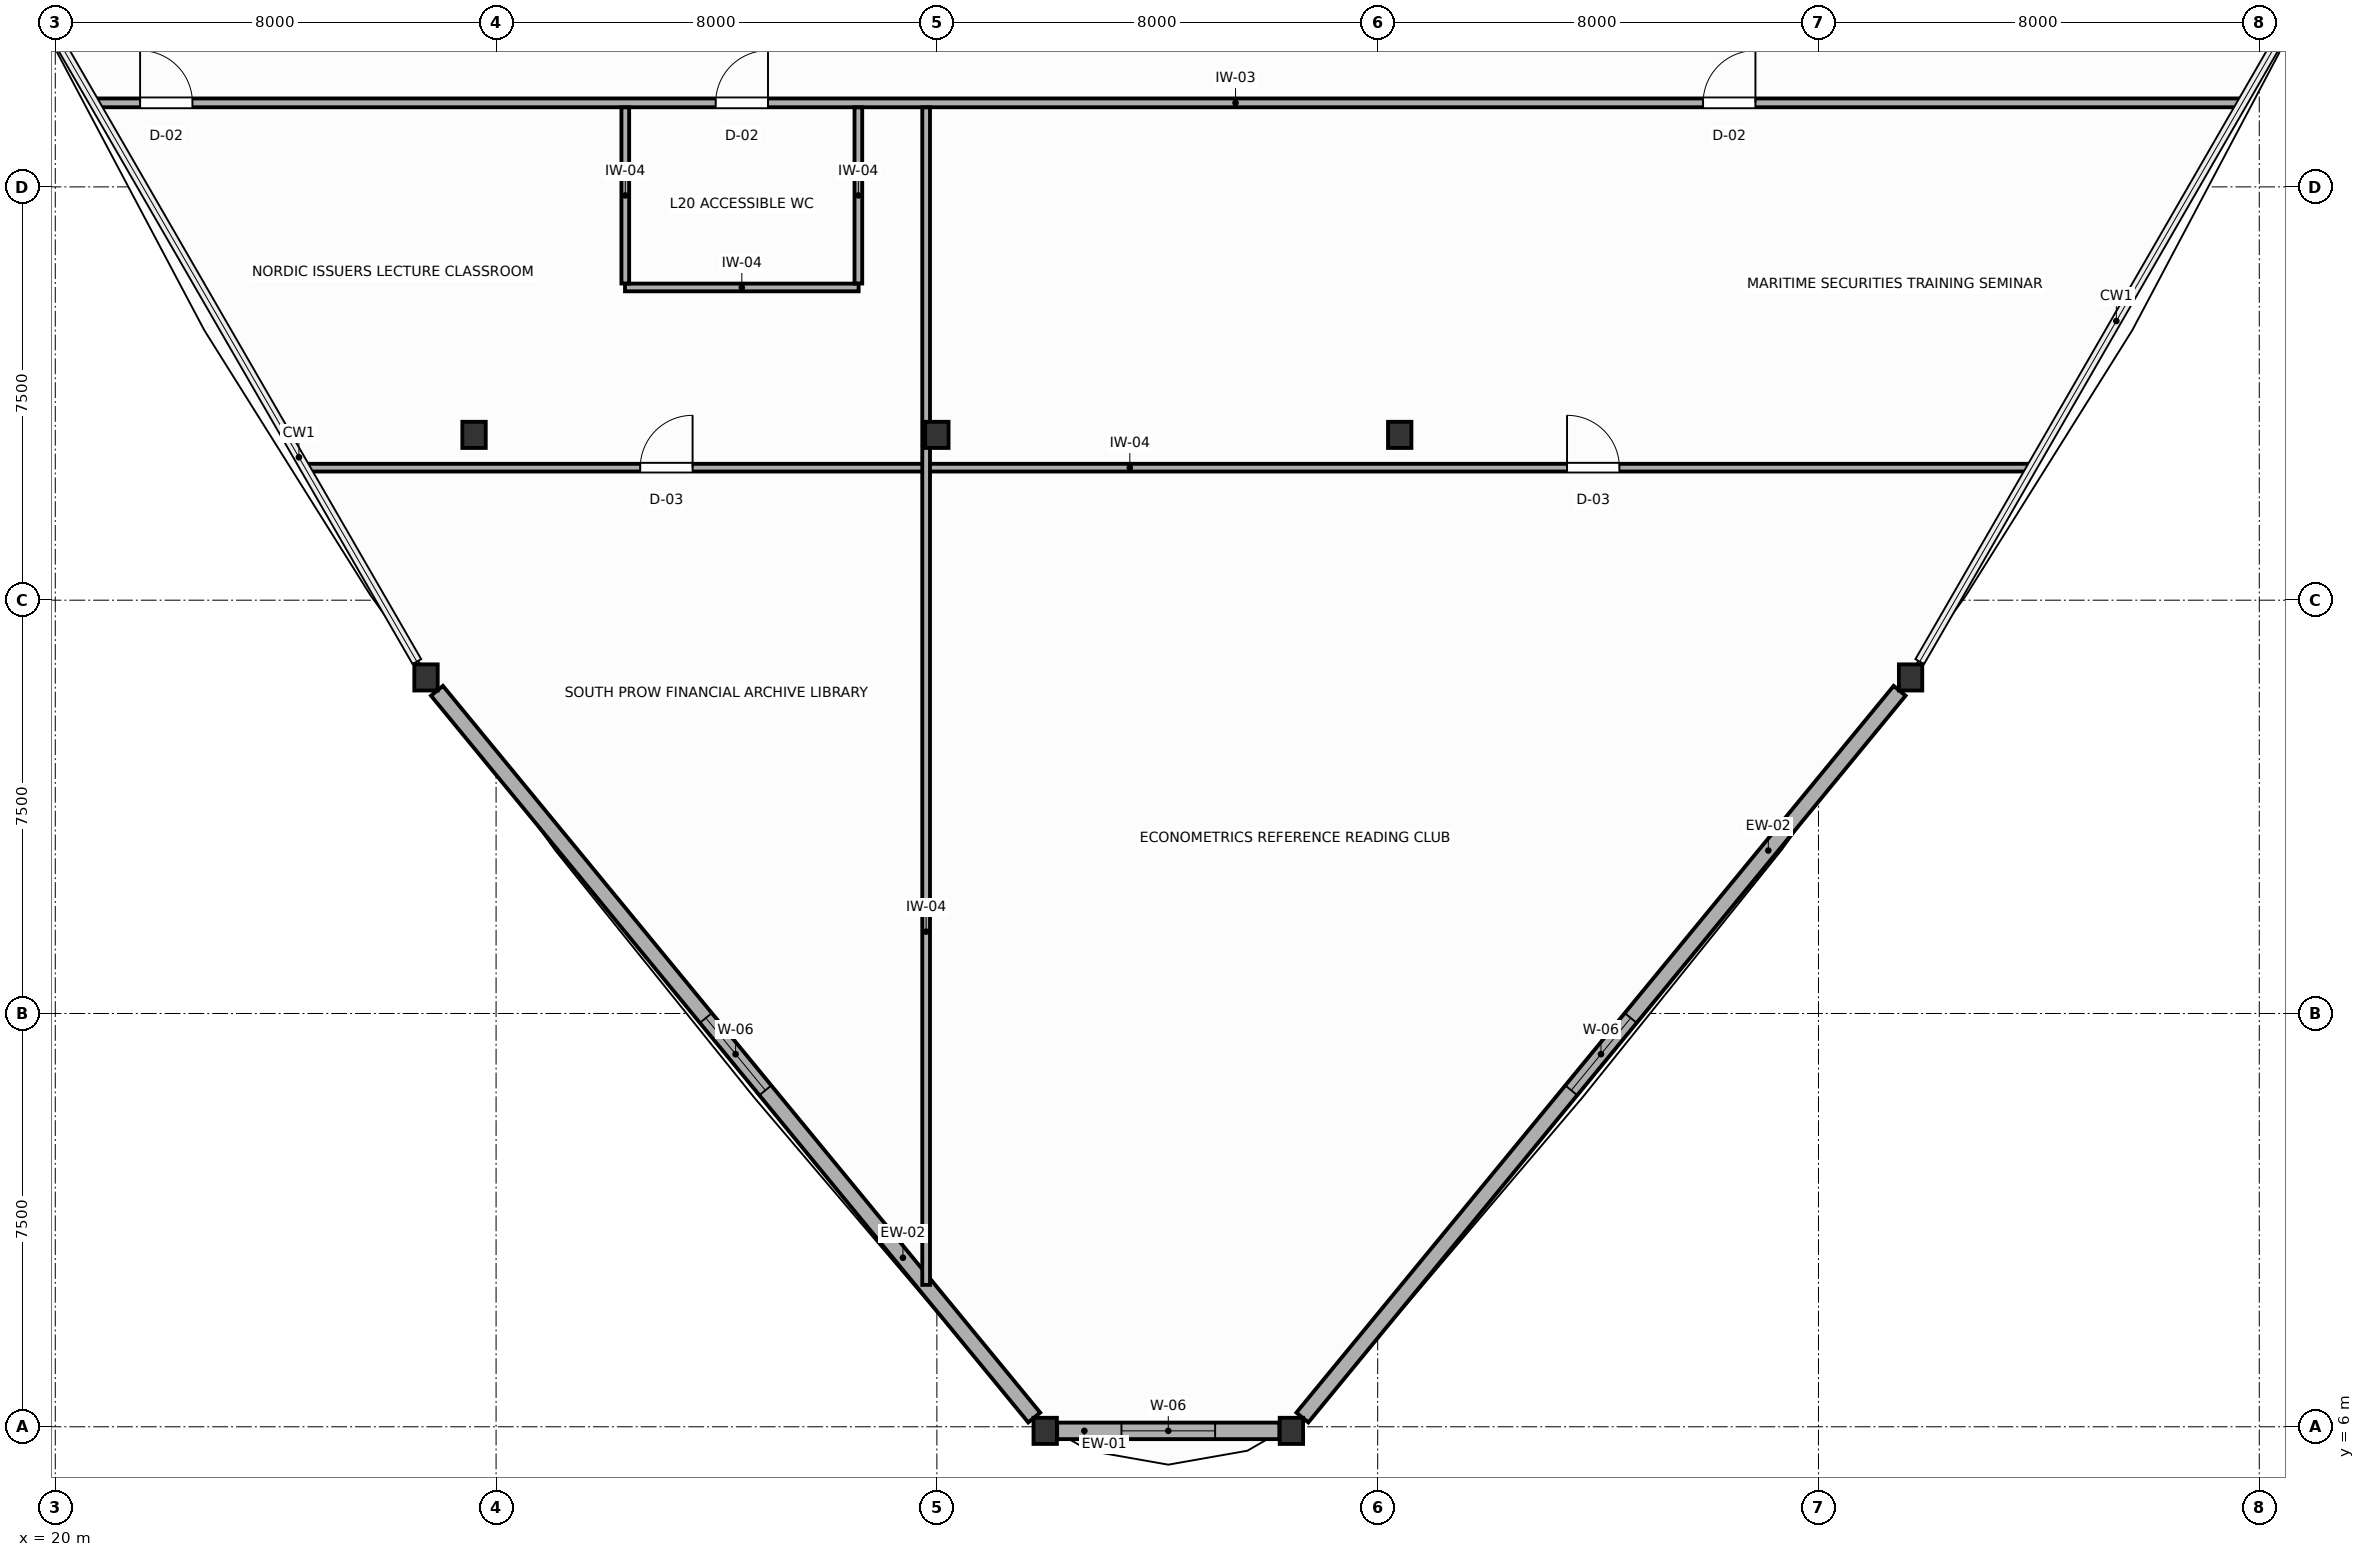
"""IFC4 building model, lengths in metres.
Left out: names, types, materials, properties, quantities, classifications, styles, units other than length and angle.
Written with IfcOpenShell. Run it as: python <this file> out.ifc"""

import sys

from ifc_helpers import new_model, si_unit, direction, frame, frame_2d, origin, origin_2d, place, context, subcontext, project, spatial, rectangle, i_section, extrude, source, transform, mapped, element, fill, save


model = new_model("IFC4")
c1 = context("Model", 3, precision=1e-05, world=origin(), true_north=direction((0.0, 1.0)))
c2 = subcontext(c1, "Body", "Model", "MODEL_VIEW")
j1 = project(units=[si_unit("LENGTHUNIT", "METRE"), si_unit("PLANEANGLEUNIT", "RADIAN")], contexts=[c1])
p1 = place(None, origin())
s1 = spatial("IfcSite", under=j1, at=p1, CompositionType="ELEMENT")
p2 = place(p1, origin())
s2 = spatial("IfcBuilding", under=s1, at=p2, CompositionType="ELEMENT")
p3 = place(p2, frame((0.0, 0.0, 83.4)))
s3 = spatial("IfcBuildingStorey", under=s2, at=p3, CompositionType="ELEMENT", Elevation=83.4)
m1 = source(origin(), c2, "Body", "SweptSolid", [
    extrude(i_section(OverallWidth=0.424, OverallDepth=0.474, WebThickness=0.045, FlangeThickness=0.072, FilletRadius=0.015, at=origin_2d()), origin(), (0.0, 0.0, 1.0), 3.9),
])
for number, where, z_axis, x_axis in (
    (1, (27.6, 24.0, 0.0), (0.0, 0.0, 1.0), (1.0, 0.0, 0.0)),
    (2, (44.4, 24.0, 0.0), (0.0, 0.0, 1.0), (1.0, 0.0, 0.0)),
    (3, (36.0, 24.0, 0.0), (0.0, 0.0, 1.0), (1.0, 0.0, 0.0)),
    (4, (26.729, 19.598, 0.0), (0.0, 0.0, 1.0), (1.0, 0.0, 0.0)),
    (5, (37.966, 5.926, 0.0), (0.0, 0.0, 1.0), (1.0, 0.0, 0.0)),
    (6, (42.434, 5.926, 0.0), (0.0, 0.0, 1.0), (1.0, 0.0, 0.0)),
    (7, (53.672, 19.598, 0.0), (0.0, 0.0, 1.0), (1.0, 0.0, 0.0)),
):
    element("IfcColumn", number, at=place(p3, frame(where, z_axis=z_axis, x_axis=x_axis)), inside=s3, PredefinedType="COLUMN", context=c2, shape_type="MappedRepresentation", body=[
        mapped(m1, transform((0.0, 0.0, 0.0), scale=1.0)),
    ])
p4 = place(p3, frame((26.927, 19.356, 0.0), z_axis=(0.0, 0.0, 1.0), x_axis=(0.634956540438, -0.772547857259, 0.0)))
e8 = element("IfcWall", 8, at=p4, inside=s3, PredefinedType="SOLIDWALL", context=c2, shape_type="SweptSolid", body=[
    extrude(rectangle(XDim=17.071, YDim=0.28, at=frame_2d((8.536, 0.0))), origin(), (0.0, 0.0, 1.0), 2.08),
])
p5 = place(p4, frame((7.686, 0.0, 0.75)))
e9 = element("IfcOpeningElement", 9, at=p5, cuts=e8, PredefinedType="OPENING", context=c2, shape_type="SweptSolid", body=[
    extrude(rectangle(XDim=1.7, YDim=1.15, at=frame_2d((0.85, 0.575))), frame((0.0, 0.15, 0.0), z_axis=(0.0, -1.0, 0.0), x_axis=(1.0, 0.0, 0.0)), (0.0, 0.0, 1.0), 0.3),
])
p6 = place(p3, frame((38.183, 5.926, 0.0), z_axis=(0.0, 0.0, 1.0), x_axis=(1.0, 0.0, 0.0)))
e10 = element("IfcWall", 10, at=p6, inside=s3, PredefinedType="SOLIDWALL", context=c2, shape_type="SweptSolid", body=[
    extrude(rectangle(XDim=4.034, YDim=0.3, at=frame_2d((2.017, 0.0))), origin(), (0.0, 0.0, 1.0), 2.08),
])
p7 = place(p6, frame((1.167, 0.0, 0.75)))
e11 = element("IfcOpeningElement", 11, at=p7, cuts=e10, PredefinedType="OPENING", context=c2, shape_type="SweptSolid", body=[
    extrude(rectangle(XDim=1.7, YDim=1.15, at=frame_2d((0.85, 0.575))), frame((0.0, 0.16, 0.0), z_axis=(0.0, -1.0, 0.0), x_axis=(1.0, 0.0, 0.0)), (0.0, 0.0, 1.0), 0.32),
])
p8 = place(p3, frame((42.633, 6.168, 0.0), z_axis=(0.0, 0.0, 1.0), x_axis=(0.634956540438, 0.772547857259, 0.0)))
e12 = element("IfcWall", 12, at=p8, inside=s3, PredefinedType="SOLIDWALL", context=c2, shape_type="SweptSolid", body=[
    extrude(rectangle(XDim=17.071, YDim=0.28, at=frame_2d((8.536, 0.0))), origin(), (0.0, 0.0, 1.0), 2.08),
])
p9 = place(p8, frame((7.686, 0.0, 0.75)))
e13 = element("IfcOpeningElement", 13, at=p9, cuts=e12, PredefinedType="OPENING", context=c2, shape_type="SweptSolid", body=[
    extrude(rectangle(XDim=1.7, YDim=1.15, at=frame_2d((0.85, 0.575))), frame((0.0, 0.15, 0.0), z_axis=(0.0, -1.0, 0.0), x_axis=(1.0, 0.0, 0.0)), (0.0, 0.0, 1.0), 0.3),
])
p10 = place(p3, frame((20.729, 30.025, 0.0), z_axis=(0.0, 0.0, 1.0), x_axis=(1.0, 0.0, 0.0)))
e14 = element("IfcWall", 14, at=p10, inside=s3, PredefinedType="PARTITIONING", context=c2, shape_type="SweptSolid", body=[
    extrude(rectangle(XDim=38.943, YDim=0.16, at=frame_2d((19.472, 0.0))), origin(), (0.0, 0.0, 1.0), 3.68),
])
p11 = place(p10, frame((11.257, 0.0, 0.0)))
e15 = element("IfcOpeningElement", 15, at=p11, cuts=e14, PredefinedType="OPENING", context=c2, shape_type="SweptSolid", body=[
    extrude(rectangle(XDim=0.95, YDim=2.05, at=frame_2d((0.475, 1.025))), frame((0.0, 0.09, 0.0), z_axis=(0.0, -1.0, 0.0), x_axis=(1.0, 0.0, 0.0)), (0.0, 0.0, 1.0), 0.18),
])
p12 = place(p10, frame((0.811, 0.0, 0.0)))
e16 = element("IfcOpeningElement", 16, at=p12, cuts=e14, PredefinedType="OPENING", context=c2, shape_type="SweptSolid", body=[
    extrude(rectangle(XDim=0.95, YDim=2.05, at=frame_2d((0.475, 1.025))), frame((0.0, 0.09, 0.0), z_axis=(0.0, -1.0, 0.0), x_axis=(1.0, 0.0, 0.0)), (0.0, 0.0, 1.0), 0.18),
])
p13 = place(p10, frame((29.177, 0.0, 0.0)))
e17 = element("IfcOpeningElement", 17, at=p13, cuts=e14, PredefinedType="OPENING", context=c2, shape_type="SweptSolid", body=[
    extrude(rectangle(XDim=0.95, YDim=2.05, at=frame_2d((0.475, 1.025))), frame((0.0, 0.09, 0.0), z_axis=(0.0, -1.0, 0.0), x_axis=(1.0, 0.0, 0.0)), (0.0, 0.0, 1.0), 0.18),
])
p14 = place(p3, frame((24.551, 23.405, 0.0), z_axis=(0.0, 0.0, 1.0), x_axis=(1.0, 0.0, 0.0)))
e18 = element("IfcWall", 18, at=p14, inside=s3, PredefinedType="PARTITIONING", context=c2, shape_type="SweptSolid", body=[
    extrude(rectangle(XDim=31.299, YDim=0.14, at=frame_2d((15.649, 0.0))), origin(), (0.0, 0.0, 1.0), 3.68),
])
p15 = place(p14, frame((6.066, 0.0, 0.0)))
e19 = element("IfcOpeningElement", 19, at=p15, cuts=e18, PredefinedType="OPENING", context=c2, shape_type="SweptSolid", body=[
    extrude(rectangle(XDim=0.95, YDim=2.05, at=frame_2d((0.475, 1.025))), frame((0.0, 0.08, 0.0), z_axis=(0.0, -1.0, 0.0), x_axis=(1.0, 0.0, 0.0)), (0.0, 0.0, 1.0), 0.16),
])
p16 = place(p14, frame((22.886, 0.0, 0.0)))
e20 = element("IfcOpeningElement", 20, at=p16, cuts=e18, PredefinedType="OPENING", context=c2, shape_type="SweptSolid", body=[
    extrude(rectangle(XDim=0.95, YDim=2.05, at=frame_2d((0.475, 1.025))), frame((0.0, 0.08, 0.0), z_axis=(0.0, -1.0, 0.0), x_axis=(1.0, 0.0, 0.0)), (0.0, 0.0, 1.0), 0.16),
])
p17 = place(p3, frame((35.805, 8.575, 0.0), z_axis=(0.0, 0.0, 1.0), x_axis=(0.0, 1.0, 0.0)))
e21 = element("IfcWall", 21, at=p17, inside=s3, PredefinedType="PARTITIONING", context=c2, shape_type="SweptSolid", body=[
    extrude(rectangle(XDim=21.368, YDim=0.14, at=frame_2d((10.684, 0.0))), origin(), (0.0, 0.0, 1.0), 2.24),
])
p18 = place(p3, frame((30.34, 26.675, 0.0), z_axis=(0.0, 0.0, 1.0), x_axis=(1.0, 0.0, 0.0)))
e22 = element("IfcWall", 22, at=p18, inside=s3, PredefinedType="PARTITIONING", context=c2, shape_type="SweptSolid", body=[
    extrude(rectangle(XDim=4.24, YDim=0.14, at=frame_2d((2.12, 0.0))), origin(), (0.0, 0.0, 1.0), 3.68),
])
for number, where, z_axis, x_axis in (
    (23, (34.575, 26.747, 0.0), (0.0, 0.0, 1.0), (0.0, 1.0, 0.0)),
    (24, (30.345, 26.747, 0.0), (0.0, 0.0, 1.0), (0.0, 1.0, 0.0)),
):
    element("IfcWall", number, at=place(p3, frame(where, z_axis=z_axis, x_axis=x_axis)), inside=s3, PredefinedType="PARTITIONING", context=c2, shape_type="SweptSolid", body=[
        extrude(rectangle(XDim=3.196, YDim=0.14, at=frame_2d((1.598, 0.0))), origin(), (0.0, 0.0, 1.0), 3.68),
    ])
p19 = place(p5, origin())
e25 = element("IfcWindow", 25, at=p19, inside=s3, PartitioningType="SINGLE_PANEL", PredefinedType="WINDOW", context=c2, shape_type="SweptSolid", body=[
    extrude(rectangle(XDim=1.7, YDim=1.15, at=frame_2d((0.85, 0.575))), frame((0.0, 0.03, 0.0), z_axis=(0.0, -1.0, 0.0), x_axis=(1.0, 0.0, 0.0)), (0.0, 0.0, 1.0), 0.06),
])
fill(e9, e25)
p20 = place(p7, origin())
e26 = element("IfcWindow", 26, at=p20, inside=s3, PartitioningType="SINGLE_PANEL", PredefinedType="WINDOW", context=c2, shape_type="SweptSolid", body=[
    extrude(rectangle(XDim=1.7, YDim=1.15, at=frame_2d((0.85, 0.575))), frame((0.0, 0.03, 0.0), z_axis=(0.0, -1.0, 0.0), x_axis=(1.0, 0.0, 0.0)), (0.0, 0.0, 1.0), 0.06),
])
fill(e11, e26)
p21 = place(p9, origin())
e27 = element("IfcWindow", 27, at=p21, inside=s3, PartitioningType="SINGLE_PANEL", PredefinedType="WINDOW", context=c2, shape_type="SweptSolid", body=[
    extrude(rectangle(XDim=1.7, YDim=1.15, at=frame_2d((0.85, 0.575))), frame((0.0, 0.03, 0.0), z_axis=(0.0, -1.0, 0.0), x_axis=(1.0, 0.0, 0.0)), (0.0, 0.0, 1.0), 0.06),
])
fill(e13, e27)
p22 = place(p11, origin())
e28 = element("IfcDoor", 28, at=p22, inside=s3, OperationType="SINGLE_SWING_RIGHT", PredefinedType="DOOR", context=c2, shape_type="SweptSolid", body=[
    extrude(rectangle(XDim=0.95, YDim=2.05, at=frame_2d((0.475, 1.025))), frame((0.0, 0.025, 0.0), z_axis=(0.0, -1.0, 0.0), x_axis=(1.0, 0.0, 0.0)), (0.0, 0.0, 1.0), 0.05),
])
fill(e15, e28)
p23 = place(p12, origin())
e29 = element("IfcDoor", 29, at=p23, inside=s3, OperationType="SINGLE_SWING_LEFT", PredefinedType="DOOR", context=c2, shape_type="SweptSolid", body=[
    extrude(rectangle(XDim=0.95, YDim=2.05, at=frame_2d((0.475, 1.025))), frame((0.0, 0.025, 0.0), z_axis=(0.0, -1.0, 0.0), x_axis=(1.0, 0.0, 0.0)), (0.0, 0.0, 1.0), 0.05),
])
fill(e16, e29)
p24 = place(p13, origin())
e30 = element("IfcDoor", 30, at=p24, inside=s3, OperationType="SINGLE_SWING_RIGHT", PredefinedType="DOOR", context=c2, shape_type="SweptSolid", body=[
    extrude(rectangle(XDim=0.95, YDim=2.05, at=frame_2d((0.475, 1.025))), frame((0.0, 0.025, 0.0), z_axis=(0.0, -1.0, 0.0), x_axis=(1.0, 0.0, 0.0)), (0.0, 0.0, 1.0), 0.05),
])
fill(e17, e30)
p25 = place(p15, origin())
e31 = element("IfcDoor", 31, at=p25, inside=s3, OperationType="SINGLE_SWING_RIGHT", PredefinedType="DOOR", context=c2, shape_type="SweptSolid", body=[
    extrude(rectangle(XDim=0.95, YDim=2.05, at=frame_2d((0.475, 1.025))), frame((0.0, 0.025, 0.0), z_axis=(0.0, -1.0, 0.0), x_axis=(1.0, 0.0, 0.0)), (0.0, 0.0, 1.0), 0.05),
])
fill(e19, e31)
p26 = place(p16, origin())
e32 = element("IfcDoor", 32, at=p26, inside=s3, OperationType="SINGLE_SWING_LEFT", PredefinedType="DOOR", context=c2, shape_type="SweptSolid", body=[
    extrude(rectangle(XDim=0.95, YDim=2.05, at=frame_2d((0.475, 1.025))), frame((0.0, 0.025, 0.0), z_axis=(0.0, -1.0, 0.0), x_axis=(1.0, 0.0, 0.0)), (0.0, 0.0, 1.0), 0.05),
])
fill(e20, e32)
save(model, sys.argv[1])
